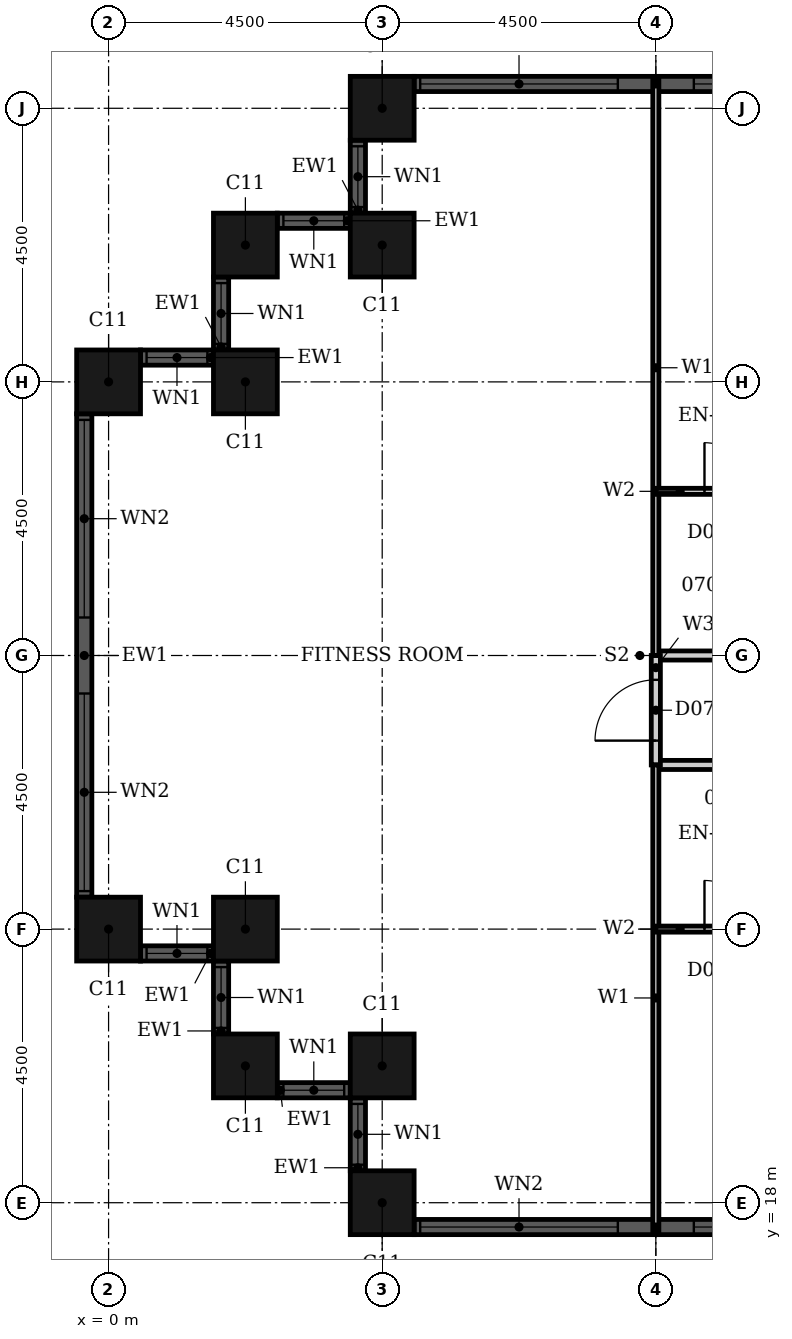
"""IFC4 building model, lengths in metres.
Left out: names, types, materials, properties, quantities, classifications, styles, units other than length and angle.
Written with IfcOpenShell. Run it as: python <this file> out.ifc"""

import sys

from ifc_helpers import new_model, si_unit, direction, frame, frame_2d, origin, origin_2d, place, context, subcontext, project, spatial, rectangle, hollow_rectangle, extrude, element, fill, save


model = new_model("IFC4")
c1 = context("Model", 3, precision=1e-05, world=origin(), true_north=direction((0.0, 1.0)))
c2 = subcontext(c1, "Body", "Model", "MODEL_VIEW")
j1 = project(units=[si_unit("LENGTHUNIT", "METRE"), si_unit("PLANEANGLEUNIT", "RADIAN")], contexts=[c1])
p1 = place(None, origin())
s1 = spatial("IfcSite", under=j1, at=p1, CompositionType="ELEMENT")
p2 = place(p1, origin())
s2 = spatial("IfcBuilding", under=s1, at=p2, CompositionType="ELEMENT")
p3 = place(p2, frame((0.0, 0.0, 37.2)))
s3 = spatial("IfcBuildingStorey", under=s2, at=p3, CompositionType="ELEMENT", Elevation=37.2)
for number, where, z_axis, x_axis in (
    (1, (4.5, 36.0, 0.0), (0.0, 0.0, 1.0), (1.0, 0.0, 0.0)),
    (2, (4.5, 33.75, 0.0), (0.0, 0.0, 1.0), (1.0, 0.0, 0.0)),
    (3, (2.25, 33.75, 0.0), (0.0, 0.0, 1.0), (1.0, 0.0, 0.0)),
    (4, (2.25, 31.5, 0.0), (0.0, 0.0, 1.0), (1.0, 0.0, 0.0)),
    (5, (0.0, 31.5, 0.0), (0.0, 0.0, 1.0), (1.0, 0.0, 0.0)),
    (6, (0.0, 22.5, 0.0), (0.0, 0.0, 1.0), (1.0, 0.0, 0.0)),
    (7, (2.25, 22.5, 0.0), (0.0, 0.0, 1.0), (1.0, 0.0, 0.0)),
    (8, (2.25, 20.25, 0.0), (0.0, 0.0, 1.0), (1.0, 0.0, 0.0)),
    (9, (4.5, 20.25, 0.0), (0.0, 0.0, 1.0), (1.0, 0.0, 0.0)),
    (10, (4.5, 18.0, 0.0), (0.0, 0.0, 1.0), (1.0, 0.0, 0.0)),
):
    element("IfcColumn", number, at=place(p3, frame(where, z_axis=z_axis, x_axis=x_axis)), inside=s3, PredefinedType="COLUMN", context=c2, shape_type="SweptSolid", body=[
        extrude(hollow_rectangle(XDim=1.05, YDim=1.05, WallThickness=0.034, at=origin_2d()), origin(), (0.0, 0.0, 1.0), 3.6),
    ])
p4 = place(p3, frame((12.975, 36.4, 0.0), z_axis=(0.0, 0.0, 1.0), x_axis=(-1.0, 0.0, 0.0)))
e11 = element("IfcWall", 11, at=p4, inside=s3, PredefinedType="SOLIDWALL", context=c2, shape_type="SweptSolid", body=[
    extrude(rectangle(XDim=7.95, YDim=0.25, at=frame_2d((3.975, 0.0))), origin(), (0.0, 0.0, 1.0), 3.6),
])
p5 = place(p4, frame((0.1, 0.0, 0.9)))
e12 = element("IfcOpeningElement", 12, at=p5, cuts=e11, PredefinedType="OPENING", context=c2, shape_type="SweptSolid", body=[
    extrude(rectangle(XDim=3.25, YDim=2.08, at=frame_2d((1.625, 1.04))), frame((0.0, 0.135, 0.0), z_axis=(0.0, -1.0, 0.0), x_axis=(1.0, 0.0, 0.0)), (0.0, 0.0, 1.0), 0.27),
])
p6 = place(p4, frame((4.6, 0.0, 0.9)))
e13 = element("IfcOpeningElement", 13, at=p6, cuts=e11, PredefinedType="OPENING", context=c2, shape_type="SweptSolid", body=[
    extrude(rectangle(XDim=3.25, YDim=2.08, at=frame_2d((1.625, 1.04))), frame((0.0, 0.135, 0.0), z_axis=(0.0, -1.0, 0.0), x_axis=(1.0, 0.0, 0.0)), (0.0, 0.0, 1.0), 0.27),
])
p7 = place(p3, frame((4.1, 35.475, 0.0), z_axis=(0.0, 0.0, 1.0), x_axis=(0.0, -1.0, 0.0)))
e14 = element("IfcWall", 14, at=p7, inside=s3, PredefinedType="SOLIDWALL", context=c2, shape_type="SweptSolid", body=[
    extrude(rectangle(XDim=1.2, YDim=0.25, at=frame_2d((0.6, 0.0))), origin(), (0.0, 0.0, 1.0), 3.6),
])
p8 = place(p7, frame((0.1, 0.0, 0.9)))
e15 = element("IfcOpeningElement", 15, at=p8, cuts=e14, PredefinedType="OPENING", context=c2, shape_type="SweptSolid", body=[
    extrude(rectangle(XDim=1.0, YDim=2.08, at=frame_2d((0.5, 1.04))), frame((0.0, 0.135, 0.0), z_axis=(0.0, -1.0, 0.0), x_axis=(1.0, 0.0, 0.0)), (0.0, 0.0, 1.0), 0.27),
])
p9 = place(p3, frame((3.975, 34.15, 0.0), z_axis=(0.0, 0.0, 1.0), x_axis=(-1.0, 0.0, 0.0)))
e16 = element("IfcWall", 16, at=p9, inside=s3, PredefinedType="SOLIDWALL", context=c2, shape_type="SweptSolid", body=[
    extrude(rectangle(XDim=1.2, YDim=0.25, at=frame_2d((0.6, 0.0))), origin(), (0.0, 0.0, 1.0), 3.6),
])
p10 = place(p9, frame((0.1, 0.0, 0.9)))
e17 = element("IfcOpeningElement", 17, at=p10, cuts=e16, PredefinedType="OPENING", context=c2, shape_type="SweptSolid", body=[
    extrude(rectangle(XDim=1.0, YDim=2.08, at=frame_2d((0.5, 1.04))), frame((0.0, 0.135, 0.0), z_axis=(0.0, -1.0, 0.0), x_axis=(1.0, 0.0, 0.0)), (0.0, 0.0, 1.0), 0.27),
])
p11 = place(p3, frame((1.85, 33.225, 0.0), z_axis=(0.0, 0.0, 1.0), x_axis=(0.0, -1.0, 0.0)))
e18 = element("IfcWall", 18, at=p11, inside=s3, PredefinedType="SOLIDWALL", context=c2, shape_type="SweptSolid", body=[
    extrude(rectangle(XDim=1.2, YDim=0.25, at=frame_2d((0.6, 0.0))), origin(), (0.0, 0.0, 1.0), 3.6),
])
p12 = place(p11, frame((0.1, 0.0, 0.9)))
e19 = element("IfcOpeningElement", 19, at=p12, cuts=e18, PredefinedType="OPENING", context=c2, shape_type="SweptSolid", body=[
    extrude(rectangle(XDim=1.0, YDim=2.08, at=frame_2d((0.5, 1.04))), frame((0.0, 0.135, 0.0), z_axis=(0.0, -1.0, 0.0), x_axis=(1.0, 0.0, 0.0)), (0.0, 0.0, 1.0), 0.27),
])
p13 = place(p3, frame((1.725, 31.9, 0.0), z_axis=(0.0, 0.0, 1.0), x_axis=(-1.0, 0.0, 0.0)))
e20 = element("IfcWall", 20, at=p13, inside=s3, PredefinedType="SOLIDWALL", context=c2, shape_type="SweptSolid", body=[
    extrude(rectangle(XDim=1.2, YDim=0.25, at=frame_2d((0.6, 0.0))), origin(), (0.0, 0.0, 1.0), 3.6),
])
p14 = place(p13, frame((0.1, 0.0, 0.9)))
e21 = element("IfcOpeningElement", 21, at=p14, cuts=e20, PredefinedType="OPENING", context=c2, shape_type="SweptSolid", body=[
    extrude(rectangle(XDim=1.0, YDim=2.08, at=frame_2d((0.5, 1.04))), frame((0.0, 0.135, 0.0), z_axis=(0.0, -1.0, 0.0), x_axis=(1.0, 0.0, 0.0)), (0.0, 0.0, 1.0), 0.27),
])
p15 = place(p3, frame((-0.4, 30.975, 0.0), z_axis=(0.0, 0.0, 1.0), x_axis=(0.0, -1.0, 0.0)))
e22 = element("IfcWall", 22, at=p15, inside=s3, PredefinedType="SOLIDWALL", context=c2, shape_type="SweptSolid", body=[
    extrude(rectangle(XDim=7.95, YDim=0.25, at=frame_2d((3.975, 0.0))), origin(), (0.0, 0.0, 1.0), 3.6),
])
p16 = place(p15, frame((0.1, 0.0, 0.9)))
e23 = element("IfcOpeningElement", 23, at=p16, cuts=e22, PredefinedType="OPENING", context=c2, shape_type="SweptSolid", body=[
    extrude(rectangle(XDim=3.25, YDim=2.08, at=frame_2d((1.625, 1.04))), frame((0.0, 0.135, 0.0), z_axis=(0.0, -1.0, 0.0), x_axis=(1.0, 0.0, 0.0)), (0.0, 0.0, 1.0), 0.27),
])
p17 = place(p15, frame((4.6, 0.0, 0.9)))
e24 = element("IfcOpeningElement", 24, at=p17, cuts=e22, PredefinedType="OPENING", context=c2, shape_type="SweptSolid", body=[
    extrude(rectangle(XDim=3.25, YDim=2.08, at=frame_2d((1.625, 1.04))), frame((0.0, 0.135, 0.0), z_axis=(0.0, -1.0, 0.0), x_axis=(1.0, 0.0, 0.0)), (0.0, 0.0, 1.0), 0.27),
])
p18 = place(p3, frame((0.525, 22.1, 0.0), z_axis=(0.0, 0.0, 1.0), x_axis=(1.0, 0.0, 0.0)))
e25 = element("IfcWall", 25, at=p18, inside=s3, PredefinedType="SOLIDWALL", context=c2, shape_type="SweptSolid", body=[
    extrude(rectangle(XDim=1.2, YDim=0.25, at=frame_2d((0.6, 0.0))), origin(), (0.0, 0.0, 1.0), 3.6),
])
p19 = place(p18, frame((0.1, 0.0, 0.9)))
e26 = element("IfcOpeningElement", 26, at=p19, cuts=e25, PredefinedType="OPENING", context=c2, shape_type="SweptSolid", body=[
    extrude(rectangle(XDim=1.0, YDim=2.08, at=frame_2d((0.5, 1.04))), frame((0.0, 0.135, 0.0), z_axis=(0.0, -1.0, 0.0), x_axis=(1.0, 0.0, 0.0)), (0.0, 0.0, 1.0), 0.27),
])
p20 = place(p3, frame((1.85, 21.975, 0.0), z_axis=(0.0, 0.0, 1.0), x_axis=(0.0, -1.0, 0.0)))
e27 = element("IfcWall", 27, at=p20, inside=s3, PredefinedType="SOLIDWALL", context=c2, shape_type="SweptSolid", body=[
    extrude(rectangle(XDim=1.2, YDim=0.25, at=frame_2d((0.6, 0.0))), origin(), (0.0, 0.0, 1.0), 3.6),
])
p21 = place(p20, frame((0.1, 0.0, 0.9)))
e28 = element("IfcOpeningElement", 28, at=p21, cuts=e27, PredefinedType="OPENING", context=c2, shape_type="SweptSolid", body=[
    extrude(rectangle(XDim=1.0, YDim=2.08, at=frame_2d((0.5, 1.04))), frame((0.0, 0.135, 0.0), z_axis=(0.0, -1.0, 0.0), x_axis=(1.0, 0.0, 0.0)), (0.0, 0.0, 1.0), 0.27),
])
p22 = place(p3, frame((2.775, 19.85, 0.0), z_axis=(0.0, 0.0, 1.0), x_axis=(1.0, 0.0, 0.0)))
e29 = element("IfcWall", 29, at=p22, inside=s3, PredefinedType="SOLIDWALL", context=c2, shape_type="SweptSolid", body=[
    extrude(rectangle(XDim=1.2, YDim=0.25, at=frame_2d((0.6, 0.0))), origin(), (0.0, 0.0, 1.0), 3.6),
])
p23 = place(p22, frame((0.1, 0.0, 0.9)))
e30 = element("IfcOpeningElement", 30, at=p23, cuts=e29, PredefinedType="OPENING", context=c2, shape_type="SweptSolid", body=[
    extrude(rectangle(XDim=1.0, YDim=2.08, at=frame_2d((0.5, 1.04))), frame((0.0, 0.135, 0.0), z_axis=(0.0, -1.0, 0.0), x_axis=(1.0, 0.0, 0.0)), (0.0, 0.0, 1.0), 0.27),
])
p24 = place(p3, frame((4.1, 19.725, 0.0), z_axis=(0.0, 0.0, 1.0), x_axis=(0.0, -1.0, 0.0)))
e31 = element("IfcWall", 31, at=p24, inside=s3, PredefinedType="SOLIDWALL", context=c2, shape_type="SweptSolid", body=[
    extrude(rectangle(XDim=1.2, YDim=0.25, at=frame_2d((0.6, 0.0))), origin(), (0.0, 0.0, 1.0), 3.6),
])
p25 = place(p24, frame((0.1, 0.0, 0.9)))
e32 = element("IfcOpeningElement", 32, at=p25, cuts=e31, PredefinedType="OPENING", context=c2, shape_type="SweptSolid", body=[
    extrude(rectangle(XDim=1.0, YDim=2.08, at=frame_2d((0.5, 1.04))), frame((0.0, 0.135, 0.0), z_axis=(0.0, -1.0, 0.0), x_axis=(1.0, 0.0, 0.0)), (0.0, 0.0, 1.0), 0.27),
])
p26 = place(p3, frame((5.025, 17.6, 0.0), z_axis=(0.0, 0.0, 1.0), x_axis=(1.0, 0.0, 0.0)))
e33 = element("IfcWall", 33, at=p26, inside=s3, PredefinedType="SOLIDWALL", context=c2, shape_type="SweptSolid", body=[
    extrude(rectangle(XDim=7.95, YDim=0.25, at=frame_2d((3.975, 0.0))), origin(), (0.0, 0.0, 1.0), 3.6),
])
p27 = place(p26, frame((0.1, 0.0, 0.9)))
e34 = element("IfcOpeningElement", 34, at=p27, cuts=e33, PredefinedType="OPENING", context=c2, shape_type="SweptSolid", body=[
    extrude(rectangle(XDim=3.25, YDim=2.08, at=frame_2d((1.625, 1.04))), frame((0.0, 0.135, 0.0), z_axis=(0.0, -1.0, 0.0), x_axis=(1.0, 0.0, 0.0)), (0.0, 0.0, 1.0), 0.27),
])
p28 = place(p26, frame((4.6, 0.0, 0.9)))
e35 = element("IfcOpeningElement", 35, at=p28, cuts=e33, PredefinedType="OPENING", context=c2, shape_type="SweptSolid", body=[
    extrude(rectangle(XDim=3.25, YDim=2.08, at=frame_2d((1.625, 1.04))), frame((0.0, 0.135, 0.0), z_axis=(0.0, -1.0, 0.0), x_axis=(1.0, 0.0, 0.0)), (0.0, 0.0, 1.0), 0.27),
])
p29 = place(p3, frame((9.0, 25.2, 0.0), z_axis=(0.0, 0.0, 1.0), x_axis=(1.0, 0.0, 0.0)))
e36 = element("IfcWall", 36, at=p29, inside=s3, PredefinedType="PARTITIONING", context=c2, shape_type="SweptSolid", body=[
    extrude(rectangle(XDim=7.2, YDim=0.15, at=frame_2d((3.6, 0.0))), origin(), (0.0, 0.0, 1.0), 3.3),
])
p30 = place(p29, frame((2.95, 0.0, 0.0)))
e37 = element("IfcOpeningElement", 37, at=p30, cuts=e36, PredefinedType="OPENING", context=c2, shape_type="SweptSolid", body=[
    extrude(rectangle(XDim=1.0, YDim=2.1, at=frame_2d((0.5, 1.05))), frame((0.0, 0.085, 0.0), z_axis=(0.0, -1.0, 0.0), x_axis=(1.0, 0.0, 0.0)), (0.0, 0.0, 1.0), 0.17),
])
p31 = place(p3, frame((9.0, 27.0, 0.0), z_axis=(0.0, 0.0, 1.0), x_axis=(1.0, 0.0, 0.0)))
e38 = element("IfcWall", 38, at=p31, inside=s3, PredefinedType="PARTITIONING", context=c2, shape_type="SweptSolid", body=[
    extrude(rectangle(XDim=7.2, YDim=0.15, at=frame_2d((3.6, 0.0))), origin(), (0.0, 0.0, 1.0), 2.58),
])
p32 = place(p31, frame((2.95, 0.0, 0.0)))
e39 = element("IfcOpeningElement", 39, at=p32, cuts=e38, PredefinedType="OPENING", context=c2, shape_type="SweptSolid", body=[
    extrude(rectangle(XDim=1.0, YDim=2.1, at=frame_2d((0.5, 1.05))), frame((0.0, 0.085, 0.0), z_axis=(0.0, -1.0, 0.0), x_axis=(1.0, 0.0, 0.0)), (0.0, 0.0, 1.0), 0.17),
])
p33 = place(p3, frame((9.0, 25.2, 0.0), z_axis=(0.0, 0.0, 1.0), x_axis=(0.0, 1.0, 0.0)))
e40 = element("IfcWall", 40, at=p33, inside=s3, PredefinedType="PARTITIONING", context=c2, shape_type="SweptSolid", body=[
    extrude(rectangle(XDim=1.8, YDim=0.15, at=frame_2d((0.9, 0.0))), origin(), (0.0, 0.0, 1.0), 3.3),
])
p34 = place(p33, frame((0.4, 0.0, 0.0)))
e41 = element("IfcOpeningElement", 41, at=p34, cuts=e40, PredefinedType="OPENING", context=c2, shape_type="SweptSolid", body=[
    extrude(rectangle(XDim=1.0, YDim=2.1, at=frame_2d((0.5, 1.05))), frame((0.0, 0.085, 0.0), z_axis=(0.0, -1.0, 0.0), x_axis=(1.0, 0.0, 0.0)), (0.0, 0.0, 1.0), 0.17),
])
p35 = place(p3, frame((9.0, 27.0, 0.0), z_axis=(0.0, 0.0, 1.0), x_axis=(0.0, 1.0, 0.0)))
e42 = element("IfcWall", 42, at=p35, inside=s3, PredefinedType="PARTITIONING", context=c2, shape_type="SweptSolid", body=[
    extrude(rectangle(XDim=9.465, YDim=0.1, at=frame_2d((4.732, 0.0))), origin(), (0.0, 0.0, 1.0), 3.3),
])
p36 = place(p3, frame((9.0, 17.535, 0.0), z_axis=(0.0, 0.0, 1.0), x_axis=(0.0, 1.0, 0.0)))
e43 = element("IfcWall", 43, at=p36, inside=s3, PredefinedType="PARTITIONING", context=c2, shape_type="SweptSolid", body=[
    extrude(rectangle(XDim=7.665, YDim=0.1, at=frame_2d((3.833, 0.0))), origin(), (0.0, 0.0, 1.0), 3.3),
])
p37 = place(p3, frame((9.0, 22.5, 0.0), z_axis=(0.0, 0.0, 1.0), x_axis=(1.0, 0.0, 0.0)))
e44 = element("IfcWall", 44, at=p37, inside=s3, PredefinedType="PARTITIONING", context=c2, shape_type="SweptSolid", body=[
    extrude(rectangle(XDim=2.4, YDim=0.1, at=frame_2d((1.2, 0.0))), origin(), (0.0, 0.0, 1.0), 2.58),
])
p38 = place(p37, frame((0.8, 0.0, 0.0)))
e45 = element("IfcOpeningElement", 45, at=p38, cuts=e44, PredefinedType="OPENING", context=c2, shape_type="SweptSolid", body=[
    extrude(rectangle(XDim=0.8, YDim=2.1, at=frame_2d((0.4, 1.05))), frame((0.0, 0.06, 0.0), z_axis=(0.0, -1.0, 0.0), x_axis=(1.0, 0.0, 0.0)), (0.0, 0.0, 1.0), 0.12),
])
p39 = place(p3, frame((9.0, 29.7, 0.0), z_axis=(0.0, 0.0, 1.0), x_axis=(1.0, 0.0, 0.0)))
e46 = element("IfcWall", 46, at=p39, inside=s3, PredefinedType="PARTITIONING", context=c2, shape_type="SweptSolid", body=[
    extrude(rectangle(XDim=2.4, YDim=0.1, at=frame_2d((1.2, 0.0))), origin(), (0.0, 0.0, 1.0), 3.3),
])
p40 = place(p39, frame((0.8, 0.0, 0.0)))
e47 = element("IfcOpeningElement", 47, at=p40, cuts=e46, PredefinedType="OPENING", context=c2, shape_type="SweptSolid", body=[
    extrude(rectangle(XDim=0.8, YDim=2.1, at=frame_2d((0.4, 1.05))), frame((0.0, 0.06, 0.0), z_axis=(0.0, -1.0, 0.0), x_axis=(1.0, 0.0, 0.0)), (0.0, 0.0, 1.0), 0.12),
])
p41 = place(p5, origin())
e48 = element("IfcWindow", 48, at=p41, inside=s3, PartitioningType="SINGLE_PANEL", PredefinedType="WINDOW", context=c2, shape_type="SweptSolid", body=[
    extrude(rectangle(XDim=3.25, YDim=2.08, at=frame_2d((1.625, 1.04))), frame((0.0, 0.03, 0.0), z_axis=(0.0, -1.0, 0.0), x_axis=(1.0, 0.0, 0.0)), (0.0, 0.0, 1.0), 0.06),
])
fill(e12, e48)
p42 = place(p6, origin())
e49 = element("IfcWindow", 49, at=p42, inside=s3, PartitioningType="SINGLE_PANEL", PredefinedType="WINDOW", context=c2, shape_type="SweptSolid", body=[
    extrude(rectangle(XDim=3.25, YDim=2.08, at=frame_2d((1.625, 1.04))), frame((0.0, 0.03, 0.0), z_axis=(0.0, -1.0, 0.0), x_axis=(1.0, 0.0, 0.0)), (0.0, 0.0, 1.0), 0.06),
])
fill(e13, e49)
p43 = place(p8, origin())
e50 = element("IfcWindow", 50, at=p43, inside=s3, PartitioningType="SINGLE_PANEL", PredefinedType="WINDOW", context=c2, shape_type="SweptSolid", body=[
    extrude(rectangle(XDim=1.0, YDim=2.08, at=frame_2d((0.5, 1.04))), frame((0.0, 0.03, 0.0), z_axis=(0.0, -1.0, 0.0), x_axis=(1.0, 0.0, 0.0)), (0.0, 0.0, 1.0), 0.06),
])
fill(e15, e50)
p44 = place(p10, origin())
e51 = element("IfcWindow", 51, at=p44, inside=s3, PartitioningType="SINGLE_PANEL", PredefinedType="WINDOW", context=c2, shape_type="SweptSolid", body=[
    extrude(rectangle(XDim=1.0, YDim=2.08, at=frame_2d((0.5, 1.04))), frame((0.0, 0.03, 0.0), z_axis=(0.0, -1.0, 0.0), x_axis=(1.0, 0.0, 0.0)), (0.0, 0.0, 1.0), 0.06),
])
fill(e17, e51)
p45 = place(p12, origin())
e52 = element("IfcWindow", 52, at=p45, inside=s3, PartitioningType="SINGLE_PANEL", PredefinedType="WINDOW", context=c2, shape_type="SweptSolid", body=[
    extrude(rectangle(XDim=1.0, YDim=2.08, at=frame_2d((0.5, 1.04))), frame((0.0, 0.03, 0.0), z_axis=(0.0, -1.0, 0.0), x_axis=(1.0, 0.0, 0.0)), (0.0, 0.0, 1.0), 0.06),
])
fill(e19, e52)
p46 = place(p14, origin())
e53 = element("IfcWindow", 53, at=p46, inside=s3, PartitioningType="SINGLE_PANEL", PredefinedType="WINDOW", context=c2, shape_type="SweptSolid", body=[
    extrude(rectangle(XDim=1.0, YDim=2.08, at=frame_2d((0.5, 1.04))), frame((0.0, 0.03, 0.0), z_axis=(0.0, -1.0, 0.0), x_axis=(1.0, 0.0, 0.0)), (0.0, 0.0, 1.0), 0.06),
])
fill(e21, e53)
p47 = place(p16, origin())
e54 = element("IfcWindow", 54, at=p47, inside=s3, PartitioningType="SINGLE_PANEL", PredefinedType="WINDOW", context=c2, shape_type="SweptSolid", body=[
    extrude(rectangle(XDim=3.25, YDim=2.08, at=frame_2d((1.625, 1.04))), frame((0.0, 0.03, 0.0), z_axis=(0.0, -1.0, 0.0), x_axis=(1.0, 0.0, 0.0)), (0.0, 0.0, 1.0), 0.06),
])
fill(e23, e54)
p48 = place(p17, origin())
e55 = element("IfcWindow", 55, at=p48, inside=s3, PartitioningType="SINGLE_PANEL", PredefinedType="WINDOW", context=c2, shape_type="SweptSolid", body=[
    extrude(rectangle(XDim=3.25, YDim=2.08, at=frame_2d((1.625, 1.04))), frame((0.0, 0.03, 0.0), z_axis=(0.0, -1.0, 0.0), x_axis=(1.0, 0.0, 0.0)), (0.0, 0.0, 1.0), 0.06),
])
fill(e24, e55)
p49 = place(p19, origin())
e56 = element("IfcWindow", 56, at=p49, inside=s3, PartitioningType="SINGLE_PANEL", PredefinedType="WINDOW", context=c2, shape_type="SweptSolid", body=[
    extrude(rectangle(XDim=1.0, YDim=2.08, at=frame_2d((0.5, 1.04))), frame((0.0, 0.03, 0.0), z_axis=(0.0, -1.0, 0.0), x_axis=(1.0, 0.0, 0.0)), (0.0, 0.0, 1.0), 0.06),
])
fill(e26, e56)
p50 = place(p21, origin())
e57 = element("IfcWindow", 57, at=p50, inside=s3, PartitioningType="SINGLE_PANEL", PredefinedType="WINDOW", context=c2, shape_type="SweptSolid", body=[
    extrude(rectangle(XDim=1.0, YDim=2.08, at=frame_2d((0.5, 1.04))), frame((0.0, 0.03, 0.0), z_axis=(0.0, -1.0, 0.0), x_axis=(1.0, 0.0, 0.0)), (0.0, 0.0, 1.0), 0.06),
])
fill(e28, e57)
p51 = place(p23, origin())
e58 = element("IfcWindow", 58, at=p51, inside=s3, PartitioningType="SINGLE_PANEL", PredefinedType="WINDOW", context=c2, shape_type="SweptSolid", body=[
    extrude(rectangle(XDim=1.0, YDim=2.08, at=frame_2d((0.5, 1.04))), frame((0.0, 0.03, 0.0), z_axis=(0.0, -1.0, 0.0), x_axis=(1.0, 0.0, 0.0)), (0.0, 0.0, 1.0), 0.06),
])
fill(e30, e58)
p52 = place(p25, origin())
e59 = element("IfcWindow", 59, at=p52, inside=s3, PartitioningType="SINGLE_PANEL", PredefinedType="WINDOW", context=c2, shape_type="SweptSolid", body=[
    extrude(rectangle(XDim=1.0, YDim=2.08, at=frame_2d((0.5, 1.04))), frame((0.0, 0.03, 0.0), z_axis=(0.0, -1.0, 0.0), x_axis=(1.0, 0.0, 0.0)), (0.0, 0.0, 1.0), 0.06),
])
fill(e32, e59)
p53 = place(p27, origin())
e60 = element("IfcWindow", 60, at=p53, inside=s3, PartitioningType="SINGLE_PANEL", PredefinedType="WINDOW", context=c2, shape_type="SweptSolid", body=[
    extrude(rectangle(XDim=3.25, YDim=2.08, at=frame_2d((1.625, 1.04))), frame((0.0, 0.03, 0.0), z_axis=(0.0, -1.0, 0.0), x_axis=(1.0, 0.0, 0.0)), (0.0, 0.0, 1.0), 0.06),
])
fill(e34, e60)
p54 = place(p28, origin())
e61 = element("IfcWindow", 61, at=p54, inside=s3, PartitioningType="SINGLE_PANEL", PredefinedType="WINDOW", context=c2, shape_type="SweptSolid", body=[
    extrude(rectangle(XDim=3.25, YDim=2.08, at=frame_2d((1.625, 1.04))), frame((0.0, 0.03, 0.0), z_axis=(0.0, -1.0, 0.0), x_axis=(1.0, 0.0, 0.0)), (0.0, 0.0, 1.0), 0.06),
])
fill(e35, e61)
p55 = place(p38, origin())
e62 = element("IfcDoor", 62, at=p55, inside=s3, OperationType="SINGLE_SWING_RIGHT", PredefinedType="DOOR", context=c2, shape_type="SweptSolid", body=[
    extrude(rectangle(XDim=0.8, YDim=2.1, at=frame_2d((0.4, 1.05))), frame((0.0, 0.025, 0.0), z_axis=(0.0, -1.0, 0.0), x_axis=(1.0, 0.0, 0.0)), (0.0, 0.0, 1.0), 0.05),
])
fill(e45, e62)
p56 = place(p40, origin())
e63 = element("IfcDoor", 63, at=p56, inside=s3, OperationType="SINGLE_SWING_RIGHT", PredefinedType="DOOR", context=c2, shape_type="SweptSolid", body=[
    extrude(rectangle(XDim=0.8, YDim=2.1, at=frame_2d((0.4, 1.05))), frame((0.0, 0.025, 0.0), z_axis=(0.0, -1.0, 0.0), x_axis=(1.0, 0.0, 0.0)), (0.0, 0.0, 1.0), 0.05),
])
fill(e47, e63)
p57 = place(p34, origin())
e64 = element("IfcDoor", 64, at=p57, inside=s3, OperationType="SINGLE_SWING_LEFT", PredefinedType="DOOR", context=c2, shape_type="SweptSolid", body=[
    extrude(rectangle(XDim=1.0, YDim=2.1, at=frame_2d((0.5, 1.05))), frame((0.0, 0.025, 0.0), z_axis=(0.0, -1.0, 0.0), x_axis=(1.0, 0.0, 0.0)), (0.0, 0.0, 1.0), 0.05),
])
fill(e41, e64)
save(model, sys.argv[1])
